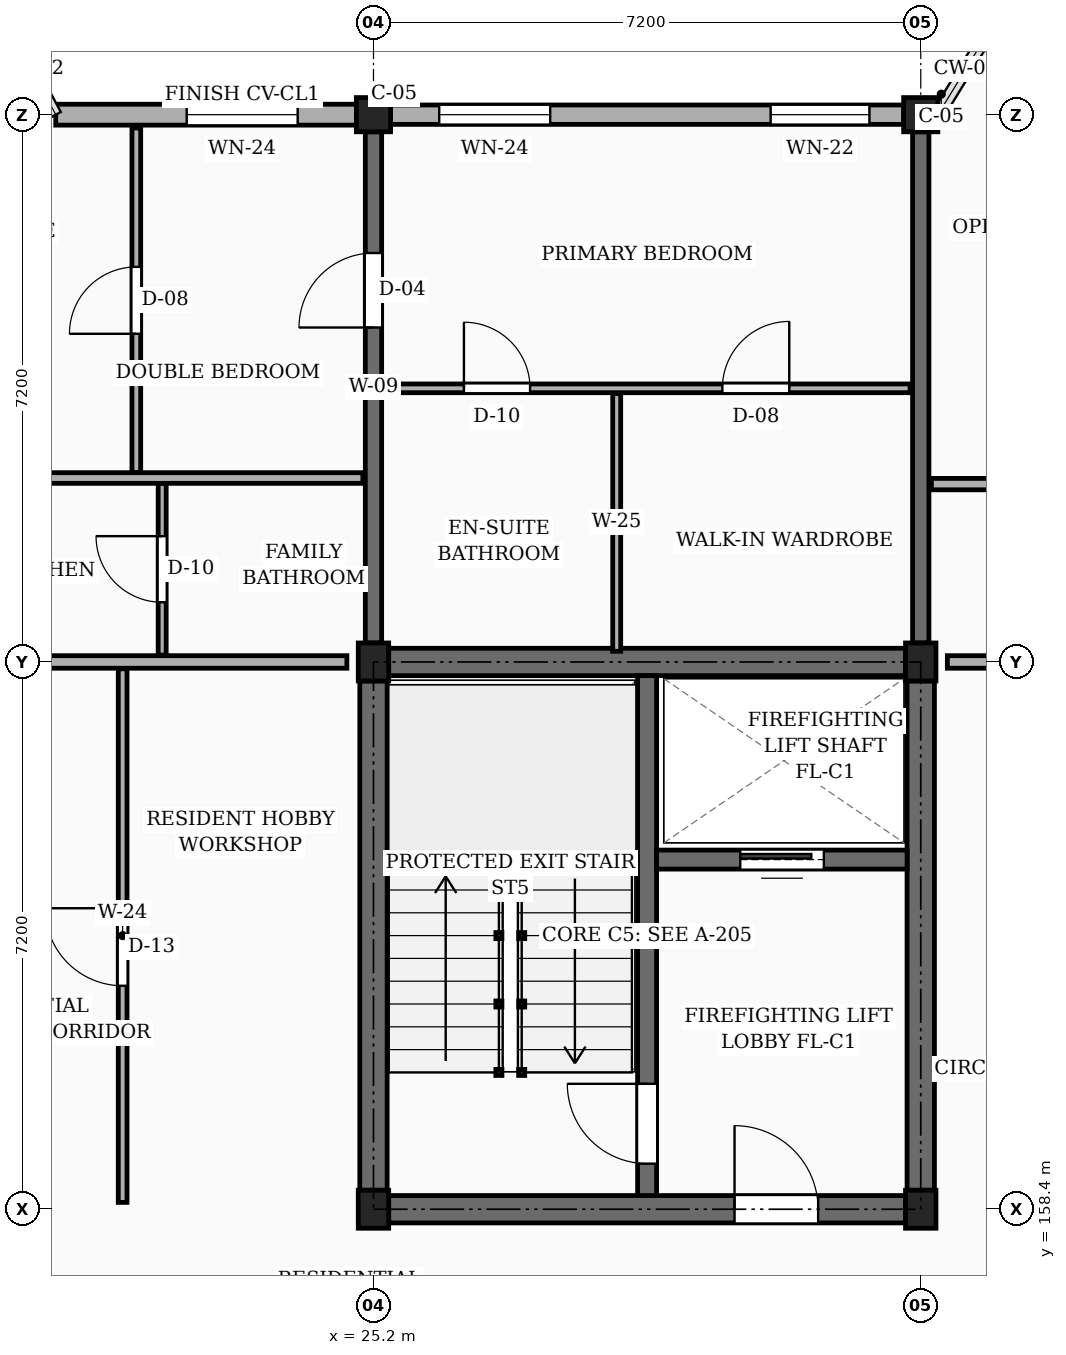
"""IFC4 building model, lengths in metres.
Left out: names, types, materials, properties, quantities, classifications, styles, units other than length and angle.
Written with IfcOpenShell. Run it as: python <this file> out.ifc"""

import sys

from ifc_helpers import new_model, si_unit, direction, frame, frame_2d, origin, origin_2d, place, context, subcontext, project, spatial, rectangle, extrude, element, fill, save


model = new_model("IFC4")
c1 = context("Model", 3, precision=1e-05, world=origin(), true_north=direction((0.0, 1.0)))
c2 = subcontext(c1, "Body", "Model", "MODEL_VIEW")
j1 = project(units=[si_unit("LENGTHUNIT", "METRE"), si_unit("PLANEANGLEUNIT", "RADIAN")], contexts=[c1])
p1 = place(None, origin())
s1 = spatial("IfcSite", under=j1, at=p1, CompositionType="ELEMENT")
p2 = place(p1, origin())
s2 = spatial("IfcBuilding", under=s1, at=p2, CompositionType="ELEMENT")
p3 = place(p2, frame((0.0, 0.0, 36.0)))
s3 = spatial("IfcBuildingStorey", under=s2, at=p3, CompositionType="ELEMENT", Elevation=36.0)
for number, where, z_axis, x_axis in (
    (1, (25.2, 158.4, 0.0), (0.0, 0.0, 1.0), (1.0, 0.0, 0.0)),
    (2, (25.2, 165.6, 0.0), (0.0, 0.0, 1.0), (1.0, 0.0, 0.0)),
):
    element("IfcColumn", number, at=place(p3, frame(where, z_axis=z_axis, x_axis=x_axis)), inside=s3, PredefinedType="COLUMN", context=c2, shape_type="SweptSolid", body=[
        extrude(rectangle(XDim=0.4, YDim=0.5, at=origin_2d()), origin(), (0.0, 0.0, 1.0), 3.15),
    ])
p4 = place(p3, frame((25.2, 172.8, 0.0), z_axis=(0.0, 0.0, 1.0), x_axis=(1.0, 0.0, 0.0)))
e3 = element("IfcColumn", 3, at=p4, inside=s3, PredefinedType="COLUMN", context=c2, shape_type="SweptSolid", body=[
    extrude(rectangle(XDim=0.45, YDim=0.45, at=origin_2d()), origin(), (0.0, 0.0, 1.0), 3.15),
])
for number, where, z_axis, x_axis in (
    (4, (32.4, 158.4, 0.0), (0.0, 0.0, 1.0), (1.0, 0.0, 0.0)),
    (5, (32.4, 165.6, 0.0), (0.0, 0.0, 1.0), (1.0, 0.0, 0.0)),
):
    element("IfcColumn", number, at=place(p3, frame(where, z_axis=z_axis, x_axis=x_axis)), inside=s3, PredefinedType="COLUMN", context=c2, shape_type="SweptSolid", body=[
        extrude(rectangle(XDim=0.4, YDim=0.5, at=origin_2d()), origin(), (0.0, 0.0, 1.0), 3.15),
    ])
p5 = place(p3, frame((32.4, 172.8, 0.0), z_axis=(0.0, 0.0, 1.0), x_axis=(1.0, 0.0, 0.0)))
e6 = element("IfcColumn", 6, at=p5, inside=s3, PredefinedType="COLUMN", context=c2, shape_type="SweptSolid", body=[
    extrude(rectangle(XDim=0.45, YDim=0.45, at=origin_2d()), origin(), (0.0, 0.0, 1.0), 3.15),
])
p6 = place(p3, frame((25.2, 165.85, 0.0), z_axis=(0.0, 0.0, 1.0), x_axis=(0.0, 1.0, 0.0)))
e7 = element("IfcWall", 7, at=p6, inside=s3, PredefinedType="SOLIDWALL", context=c2, shape_type="SweptSolid", body=[
    extrude(rectangle(XDim=6.725, YDim=0.215, at=frame_2d((3.362, 0.0))), origin(), (0.0, 0.0, 1.0), 2.185),
])
p7 = place(p6, frame((4.15, 0.0, 0.0)))
e8 = element("IfcOpeningElement", 8, at=p7, cuts=e7, PredefinedType="OPENING", context=c2, shape_type="SweptSolid", body=[
    extrude(rectangle(XDim=0.98, YDim=2.12, at=frame_2d((0.49, 1.06))), frame((0.0, 0.118, 0.0), z_axis=(0.0, -1.0, 0.0), x_axis=(1.0, 0.0, 0.0)), (0.0, 0.0, 1.0), 0.235),
])
p8 = place(p3, frame((32.4, 165.85, 0.0), z_axis=(0.0, 0.0, 1.0), x_axis=(0.0, 1.0, 0.0)))
e9 = element("IfcWall", 9, at=p8, inside=s3, PredefinedType="SOLIDWALL", context=c2, shape_type="SweptSolid", body=[
    extrude(rectangle(XDim=6.725, YDim=0.215, at=frame_2d((3.362, 0.0))), origin(), (0.0, 0.0, 1.0), 2.185),
])
p9 = place(p3, frame((32.175, 172.8, 0.0), z_axis=(0.0, 0.0, 1.0), x_axis=(-1.0, 0.0, 0.0)))
e10 = element("IfcWall", 10, at=p9, inside=s3, PredefinedType="SOLIDWALL", context=c2, shape_type="SweptSolid", body=[
    extrude(rectangle(XDim=6.75, YDim=0.255, at=frame_2d((3.375, 0.0))), origin(), (0.0, 0.0, 1.0), 2.455),
])
p10 = place(p9, frame((0.45, 0.0, 0.78)))
e11 = element("IfcOpeningElement", 11, at=p10, cuts=e10, PredefinedType="OPENING", context=c2, shape_type="SweptSolid", body=[
    extrude(rectangle(XDim=1.3, YDim=1.36, at=frame_2d((0.65, 0.68))), frame((0.0, 0.137, 0.0), z_axis=(0.0, -1.0, 0.0), x_axis=(1.0, 0.0, 0.0)), (0.0, 0.0, 1.0), 0.275),
])
p11 = place(p9, frame((4.65, 0.0, 0.78)))
e12 = element("IfcOpeningElement", 12, at=p11, cuts=e10, PredefinedType="OPENING", context=c2, shape_type="SweptSolid", body=[
    extrude(rectangle(XDim=1.46, YDim=1.36, at=frame_2d((0.73, 0.68))), frame((0.0, 0.137, 0.0), z_axis=(0.0, -1.0, 0.0), x_axis=(1.0, 0.0, 0.0)), (0.0, 0.0, 1.0), 0.275),
])
p12 = place(p3, frame((24.975, 172.8, 0.0), z_axis=(0.0, 0.0, 1.0), x_axis=(-1.0, 0.0, 0.0)))
e13 = element("IfcWall", 13, at=p12, inside=s3, PredefinedType="SOLIDWALL", context=c2, shape_type="SweptSolid", body=[
    extrude(rectangle(XDim=3.955, YDim=0.275, at=frame_2d((1.978, 0.0))), origin(), (0.0, 0.0, 1.0), 2.455),
])
p13 = place(p12, frame((0.772, 0.0, 0.78)))
e14 = element("IfcOpeningElement", 14, at=p13, cuts=e13, PredefinedType="OPENING", context=c2, shape_type="SweptSolid", body=[
    extrude(rectangle(XDim=1.46, YDim=1.36, at=frame_2d((0.73, 0.68))), frame((0.0, 0.147, 0.0), z_axis=(0.0, -1.0, 0.0), x_axis=(1.0, 0.0, 0.0)), (0.0, 0.0, 1.0), 0.295),
])
p14 = place(p3, frame((25.2, 158.65, 0.0), z_axis=(0.0, 0.0, 1.0), x_axis=(0.0, 1.0, 0.0)))
e15 = element("IfcWall", 15, at=p14, inside=s3, PredefinedType="SHEAR", context=c2, shape_type="SweptSolid", body=[
    extrude(rectangle(XDim=6.7, YDim=0.36, at=frame_2d((3.35, 0.0))), origin(), (0.0, 0.0, 1.0), 2.885),
])
p15 = place(p3, frame((25.4, 165.6, 0.0), z_axis=(0.0, 0.0, 1.0), x_axis=(1.0, 0.0, 0.0)))
e16 = element("IfcWall", 16, at=p15, inside=s3, PredefinedType="SHEAR", context=c2, shape_type="SweptSolid", body=[
    extrude(rectangle(XDim=6.8, YDim=0.36, at=frame_2d((3.4, 0.0))), origin(), (0.0, 0.0, 1.0), 2.885),
])
p16 = place(p3, frame((32.4, 158.65, 0.0), z_axis=(0.0, 0.0, 1.0), x_axis=(0.0, 1.0, 0.0)))
e17 = element("IfcWall", 17, at=p16, inside=s3, PredefinedType="SHEAR", context=c2, shape_type="SweptSolid", body=[
    extrude(rectangle(XDim=6.7, YDim=0.36, at=frame_2d((3.35, 0.0))), origin(), (0.0, 0.0, 1.0), 2.885),
])
p17 = place(p3, frame((25.4, 158.4, 0.0), z_axis=(0.0, 0.0, 1.0), x_axis=(1.0, 0.0, 0.0)))
e18 = element("IfcWall", 18, at=p17, inside=s3, PredefinedType="SHEAR", context=c2, shape_type="SweptSolid", body=[
    extrude(rectangle(XDim=6.8, YDim=0.36, at=frame_2d((3.4, 0.0))), origin(), (0.0, 0.0, 1.0), 2.885),
])
p18 = place(p17, frame((4.55, 0.0, 0.0)))
e19 = element("IfcOpeningElement", 19, at=p18, cuts=e18, PredefinedType="OPENING", context=c2, shape_type="SweptSolid", body=[
    extrude(rectangle(XDim=1.1, YDim=2.15, at=frame_2d((0.55, 1.075))), frame((0.0, 0.19, 0.0), z_axis=(0.0, -1.0, 0.0), x_axis=(1.0, 0.0, 0.0)), (0.0, 0.0, 1.0), 0.38),
])
p19 = place(p3, frame((28.8, 158.58, 0.0), z_axis=(0.0, 0.0, 1.0), x_axis=(0.0, 1.0, 0.0)))
e20 = element("IfcWall", 20, at=p19, inside=s3, PredefinedType="SHEAR", context=c2, shape_type="SweptSolid", body=[
    extrude(rectangle(XDim=6.84, YDim=0.25, at=frame_2d((3.42, 0.0))), origin(), (0.0, 0.0, 1.0), 2.885),
])
p20 = place(p19, frame((0.42, 0.0, 0.0)))
e21 = element("IfcOpeningElement", 21, at=p20, cuts=e20, PredefinedType="OPENING", context=c2, shape_type="SweptSolid", body=[
    extrude(rectangle(XDim=1.05, YDim=2.15, at=frame_2d((0.525, 1.075))), frame((0.0, 0.135, 0.0), z_axis=(0.0, -1.0, 0.0), x_axis=(1.0, 0.0, 0.0)), (0.0, 0.0, 1.0), 0.27),
])
p21 = place(p3, frame((28.925, 163.0, 0.0), z_axis=(0.0, 0.0, 1.0), x_axis=(1.0, 0.0, 0.0)))
e22 = element("IfcWall", 22, at=p21, inside=s3, PredefinedType="SHEAR", context=c2, shape_type="SweptSolid", body=[
    extrude(rectangle(XDim=3.295, YDim=0.25, at=frame_2d((1.647, 0.0))), origin(), (0.0, 0.0, 1.0), 2.885),
])
p22 = place(p21, frame((1.1, 0.0, 0.0)))
e23 = element("IfcOpeningElement", 23, at=p22, cuts=e22, PredefinedType="OPENING", context=c2, shape_type="SweptSolid", body=[
    extrude(rectangle(XDim=1.1, YDim=2.2, at=frame_2d((0.55, 1.1))), frame((0.0, 0.135, 0.0), z_axis=(0.0, -1.0, 0.0), x_axis=(1.0, 0.0, 0.0)), (0.0, 0.0, 1.0), 0.27),
])
p23 = place(p3, frame((18.35, 165.6, 0.0), z_axis=(0.0, 0.0, 1.0), x_axis=(1.0, 0.0, 0.0)))
e24 = element("IfcWall", 24, at=p23, inside=s3, PredefinedType="PARTITIONING", context=c2, shape_type="SweptSolid", body=[
    extrude(rectangle(XDim=6.5, YDim=0.165, at=frame_2d((3.25, 0.0))), origin(), (0.0, 0.0, 1.0), 2.32),
])
p24 = place(p23, frame((1.0, 0.0, 0.0)))
e25 = element("IfcOpeningElement", 25, at=p24, cuts=e24, PredefinedType="OPENING", context=c2, shape_type="SweptSolid", body=[
    extrude(rectangle(XDim=1.14, YDim=2.18, at=frame_2d((0.57, 1.09))), frame((0.0, 0.093, 0.0), z_axis=(0.0, -1.0, 0.0), x_axis=(1.0, 0.0, 0.0)), (0.0, 0.0, 1.0), 0.185),
])
p25 = place(p3, frame((32.75, 165.6, 0.0), z_axis=(0.0, 0.0, 1.0), x_axis=(1.0, 0.0, 0.0)))
e26 = element("IfcWall", 26, at=p25, inside=s3, PredefinedType="PARTITIONING", context=c2, shape_type="SweptSolid", body=[
    extrude(rectangle(XDim=6.5, YDim=0.165, at=frame_2d((3.25, 0.0))), origin(), (0.0, 0.0, 1.0), 2.32),
])
p26 = place(p25, frame((1.0, 0.0, 0.0)))
e27 = element("IfcOpeningElement", 27, at=p26, cuts=e26, PredefinedType="OPENING", context=c2, shape_type="SweptSolid", body=[
    extrude(rectangle(XDim=1.0, YDim=2.15, at=frame_2d((0.5, 1.075))), frame((0.0, 0.093, 0.0), z_axis=(0.0, -1.0, 0.0), x_axis=(1.0, 0.0, 0.0)), (0.0, 0.0, 1.0), 0.185),
])
p27 = place(p3, frame((21.9, 158.49, 0.0), z_axis=(0.0, 0.0, 1.0), x_axis=(0.0, 1.0, 0.0)))
e28 = element("IfcWall", 28, at=p27, inside=s3, PredefinedType="PARTITIONING", context=c2, shape_type="SweptSolid", body=[
    extrude(rectangle(XDim=7.02, YDim=0.115, at=frame_2d((3.51, 0.0))), origin(), (0.0, 0.0, 1.0), 2.32),
])
p28 = place(p27, frame((2.85, 0.0, 0.0)))
e29 = element("IfcOpeningElement", 29, at=p28, cuts=e28, PredefinedType="OPENING", context=c2, shape_type="SweptSolid", body=[
    extrude(rectangle(XDim=1.02, YDim=2.15, at=frame_2d((0.51, 1.075))), frame((0.0, 0.067, 0.0), z_axis=(0.0, -1.0, 0.0), x_axis=(1.0, 0.0, 0.0)), (0.0, 0.0, 1.0), 0.135),
])
p29 = place(p3, frame((22.08, 168.09, 0.0), z_axis=(0.0, 0.0, 1.0), x_axis=(0.0, 1.0, 0.0)))
e30 = element("IfcWall", 30, at=p29, inside=s3, PredefinedType="PARTITIONING", context=c2, shape_type="SweptSolid", body=[
    extrude(rectangle(XDim=4.535, YDim=0.115, at=frame_2d((2.268, 0.0))), origin(), (0.0, 0.0, 1.0), 2.32),
])
p30 = place(p29, frame((1.827, 0.0, 0.0)))
e31 = element("IfcOpeningElement", 31, at=p30, cuts=e30, PredefinedType="OPENING", context=c2, shape_type="SweptSolid", body=[
    extrude(rectangle(XDim=0.88, YDim=2.08, at=frame_2d((0.44, 1.04))), frame((0.0, 0.067, 0.0), z_axis=(0.0, -1.0, 0.0), x_axis=(1.0, 0.0, 0.0)), (0.0, 0.0, 1.0), 0.135),
])
p31 = place(p3, frame((22.42, 165.69, 0.0), z_axis=(0.0, 0.0, 1.0), x_axis=(0.0, 1.0, 0.0)))
e32 = element("IfcWall", 32, at=p31, inside=s3, PredefinedType="PARTITIONING", context=c2, shape_type="SweptSolid", body=[
    extrude(rectangle(XDim=2.26, YDim=0.105, at=frame_2d((1.13, 0.0))), origin(), (0.0, 0.0, 1.0), 2.32),
])
p32 = place(p31, frame((0.695, 0.0, 0.0)))
e33 = element("IfcOpeningElement", 33, at=p32, cuts=e32, PredefinedType="OPENING", context=c2, shape_type="SweptSolid", body=[
    extrude(rectangle(XDim=0.87, YDim=2.05, at=frame_2d((0.435, 1.025))), frame((0.0, 0.062, 0.0), z_axis=(0.0, -1.0, 0.0), x_axis=(1.0, 0.0, 0.0)), (0.0, 0.0, 1.0), 0.125),
])
p33 = place(p3, frame((18.175, 168.02, 0.0), z_axis=(0.0, 0.0, 1.0), x_axis=(1.0, 0.0, 0.0)))
e34 = element("IfcWall", 34, at=p33, inside=s3, PredefinedType="PARTITIONING", context=c2, shape_type="SweptSolid", body=[
    extrude(rectangle(XDim=6.885, YDim=0.14, at=frame_2d((3.442, 0.0))), origin(), (0.0, 0.0, 1.0), 2.32),
])
p34 = place(p33, frame((1.275, 0.0, 0.0)))
e35 = element("IfcOpeningElement", 35, at=p34, cuts=e34, PredefinedType="OPENING", context=c2, shape_type="SweptSolid", body=[
    extrude(rectangle(XDim=0.92, YDim=2.1, at=frame_2d((0.46, 1.05))), frame((0.0, 0.08, 0.0), z_axis=(0.0, -1.0, 0.0), x_axis=(1.0, 0.0, 0.0)), (0.0, 0.0, 1.0), 0.16),
])
p35 = place(p3, frame((25.34, 169.2, 0.0), z_axis=(0.0, 0.0, 1.0), x_axis=(1.0, 0.0, 0.0)))
e36 = element("IfcWall", 36, at=p35, inside=s3, PredefinedType="PARTITIONING", context=c2, shape_type="SweptSolid", body=[
    extrude(rectangle(XDim=6.92, YDim=0.115, at=frame_2d((3.46, 0.0))), origin(), (0.0, 0.0, 1.0), 2.32),
])
p36 = place(p35, frame((1.05, 0.0, 0.0)))
e37 = element("IfcOpeningElement", 37, at=p36, cuts=e36, PredefinedType="OPENING", context=c2, shape_type="SweptSolid", body=[
    extrude(rectangle(XDim=0.87, YDim=2.05, at=frame_2d((0.435, 1.025))), frame((0.0, 0.067, 0.0), z_axis=(0.0, -1.0, 0.0), x_axis=(1.0, 0.0, 0.0)), (0.0, 0.0, 1.0), 0.135),
])
p37 = place(p35, frame((4.45, 0.0, 0.0)))
e38 = element("IfcOpeningElement", 38, at=p37, cuts=e36, PredefinedType="OPENING", context=c2, shape_type="SweptSolid", body=[
    extrude(rectangle(XDim=0.88, YDim=2.08, at=frame_2d((0.44, 1.04))), frame((0.0, 0.067, 0.0), z_axis=(0.0, -1.0, 0.0), x_axis=(1.0, 0.0, 0.0)), (0.0, 0.0, 1.0), 0.135),
])
p38 = place(p3, frame((28.4, 165.74, 0.0), z_axis=(0.0, 0.0, 1.0), x_axis=(0.0, 1.0, 0.0)))
e39 = element("IfcWall", 39, at=p38, inside=s3, PredefinedType="PARTITIONING", context=c2, shape_type="SweptSolid", body=[
    extrude(rectangle(XDim=3.39, YDim=0.105, at=frame_2d((1.695, 0.0))), origin(), (0.0, 0.0, 1.0), 2.32),
])
p39 = place(p3, frame((32.54, 167.94, 0.0), z_axis=(0.0, 0.0, 1.0), x_axis=(1.0, 0.0, 0.0)))
e40 = element("IfcWall", 40, at=p39, inside=s3, PredefinedType="PARTITIONING", context=c2, shape_type="SweptSolid", body=[
    extrude(rectangle(XDim=6.92, YDim=0.15, at=frame_2d((3.46, 0.0))), origin(), (0.0, 0.0, 1.0), 2.32),
])
p40 = place(p39, frame((1.31, 0.0, 0.0)))
e41 = element("IfcOpeningElement", 41, at=p40, cuts=e40, PredefinedType="OPENING", context=c2, shape_type="SweptSolid", body=[
    extrude(rectangle(XDim=0.92, YDim=2.1, at=frame_2d((0.46, 1.05))), frame((0.0, 0.085, 0.0), z_axis=(0.0, -1.0, 0.0), x_axis=(1.0, 0.0, 0.0)), (0.0, 0.0, 1.0), 0.17),
])
p41 = place(p10, origin())
e42 = element("IfcWindow", 42, at=p41, inside=s3, PartitioningType="SINGLE_PANEL", PredefinedType="WINDOW", context=c2, shape_type="SweptSolid", body=[
    extrude(rectangle(XDim=1.3, YDim=1.36, at=frame_2d((0.65, 0.68))), frame((0.0, 0.03, 0.0), z_axis=(0.0, -1.0, 0.0), x_axis=(1.0, 0.0, 0.0)), (0.0, 0.0, 1.0), 0.06),
])
fill(e11, e42)
p42 = place(p11, origin())
e43 = element("IfcWindow", 43, at=p42, inside=s3, PartitioningType="SINGLE_PANEL", PredefinedType="WINDOW", context=c2, shape_type="SweptSolid", body=[
    extrude(rectangle(XDim=1.46, YDim=1.36, at=frame_2d((0.73, 0.68))), frame((0.0, 0.03, 0.0), z_axis=(0.0, -1.0, 0.0), x_axis=(1.0, 0.0, 0.0)), (0.0, 0.0, 1.0), 0.06),
])
fill(e12, e43)
p43 = place(p13, origin())
e44 = element("IfcWindow", 44, at=p43, inside=s3, PartitioningType="SINGLE_PANEL", PredefinedType="WINDOW", context=c2, shape_type="SweptSolid", body=[
    extrude(rectangle(XDim=1.46, YDim=1.36, at=frame_2d((0.73, 0.68))), frame((0.0, 0.03, 0.0), z_axis=(0.0, -1.0, 0.0), x_axis=(1.0, 0.0, 0.0)), (0.0, 0.0, 1.0), 0.06),
])
fill(e14, e44)
p44 = place(p18, frame((1.1, 0.0, 0.0), z_axis=(0.0, 0.0, 1.0), x_axis=(-1.0, 0.0, 0.0)))
e45 = element("IfcDoor", 45, at=p44, inside=s3, OperationType="SINGLE_SWING_LEFT", PredefinedType="DOOR", context=c2, shape_type="SweptSolid", body=[
    extrude(rectangle(XDim=1.1, YDim=2.15, at=frame_2d((0.55, 1.075))), frame((0.0, 0.025, 0.0), z_axis=(0.0, -1.0, 0.0), x_axis=(1.0, 0.0, 0.0)), (0.0, 0.0, 1.0), 0.05),
])
fill(e19, e45)
p45 = place(p20, origin())
e46 = element("IfcDoor", 46, at=p45, inside=s3, OperationType="SINGLE_SWING_RIGHT", PredefinedType="DOOR", context=c2, shape_type="SweptSolid", body=[
    extrude(rectangle(XDim=1.05, YDim=2.15, at=frame_2d((0.525, 1.075))), frame((0.0, 0.025, 0.0), z_axis=(0.0, -1.0, 0.0), x_axis=(1.0, 0.0, 0.0)), (0.0, 0.0, 1.0), 0.05),
])
fill(e21, e46)
p46 = place(p22, origin())
e47 = element("IfcDoor", 47, at=p46, inside=s3, OperationType="SLIDING_TO_LEFT", PredefinedType="DOOR", context=c2, shape_type="SweptSolid", body=[
    extrude(rectangle(XDim=1.1, YDim=2.2, at=frame_2d((0.55, 1.1))), frame((0.0, 0.025, 0.0), z_axis=(0.0, -1.0, 0.0), x_axis=(1.0, 0.0, 0.0)), (0.0, 0.0, 1.0), 0.05),
])
fill(e23, e47)
p47 = place(p28, origin())
e48 = element("IfcDoor", 48, at=p47, inside=s3, OperationType="SINGLE_SWING_RIGHT", PredefinedType="DOOR", context=c2, shape_type="SweptSolid", body=[
    extrude(rectangle(XDim=1.02, YDim=2.15, at=frame_2d((0.51, 1.075))), frame((0.0, 0.025, 0.0), z_axis=(0.0, -1.0, 0.0), x_axis=(1.0, 0.0, 0.0)), (0.0, 0.0, 1.0), 0.05),
])
fill(e29, e48)
p48 = place(p30, origin())
e49 = element("IfcDoor", 49, at=p48, inside=s3, OperationType="SINGLE_SWING_LEFT", PredefinedType="DOOR", context=c2, shape_type="SweptSolid", body=[
    extrude(rectangle(XDim=0.88, YDim=2.08, at=frame_2d((0.44, 1.04))), frame((0.0, 0.025, 0.0), z_axis=(0.0, -1.0, 0.0), x_axis=(1.0, 0.0, 0.0)), (0.0, 0.0, 1.0), 0.05),
])
fill(e31, e49)
p49 = place(p32, origin())
e50 = element("IfcDoor", 50, at=p49, inside=s3, OperationType="SINGLE_SWING_RIGHT", PredefinedType="DOOR", context=c2, shape_type="SweptSolid", body=[
    extrude(rectangle(XDim=0.87, YDim=2.05, at=frame_2d((0.435, 1.025))), frame((0.0, 0.025, 0.0), z_axis=(0.0, -1.0, 0.0), x_axis=(1.0, 0.0, 0.0)), (0.0, 0.0, 1.0), 0.05),
])
fill(e33, e50)
p50 = place(p36, origin())
e51 = element("IfcDoor", 51, at=p50, inside=s3, OperationType="SINGLE_SWING_LEFT", PredefinedType="DOOR", context=c2, shape_type="SweptSolid", body=[
    extrude(rectangle(XDim=0.87, YDim=2.05, at=frame_2d((0.435, 1.025))), frame((0.0, 0.025, 0.0), z_axis=(0.0, -1.0, 0.0), x_axis=(1.0, 0.0, 0.0)), (0.0, 0.0, 1.0), 0.05),
])
fill(e37, e51)
p51 = place(p37, origin())
e52 = element("IfcDoor", 52, at=p51, inside=s3, OperationType="SINGLE_SWING_RIGHT", PredefinedType="DOOR", context=c2, shape_type="SweptSolid", body=[
    extrude(rectangle(XDim=0.88, YDim=2.08, at=frame_2d((0.44, 1.04))), frame((0.0, 0.025, 0.0), z_axis=(0.0, -1.0, 0.0), x_axis=(1.0, 0.0, 0.0)), (0.0, 0.0, 1.0), 0.05),
])
fill(e38, e52)
p52 = place(p7, origin())
e53 = element("IfcDoor", 53, at=p52, inside=s3, OperationType="SINGLE_SWING_LEFT", PredefinedType="DOOR", context=c2, shape_type="SweptSolid", body=[
    extrude(rectangle(XDim=0.98, YDim=2.12, at=frame_2d((0.49, 1.06))), frame((0.0, 0.025, 0.0), z_axis=(0.0, -1.0, 0.0), x_axis=(1.0, 0.0, 0.0)), (0.0, 0.0, 1.0), 0.05),
])
fill(e8, e53)
save(model, sys.argv[1])
